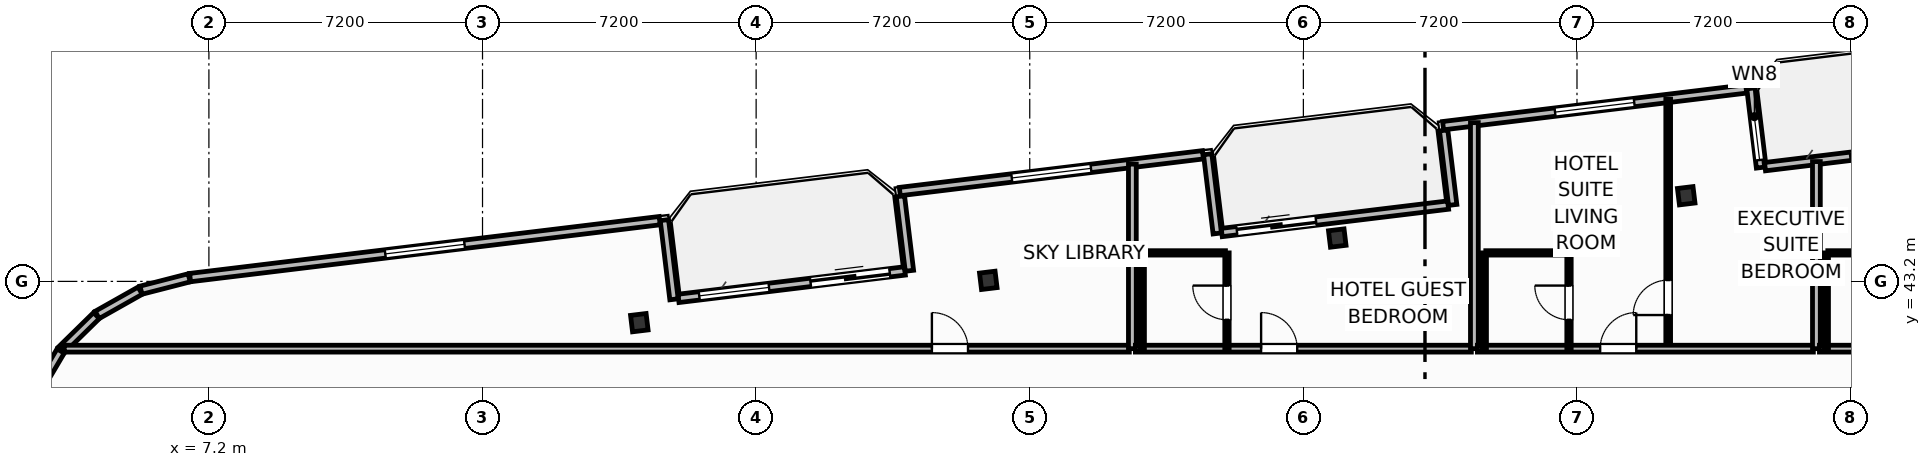
"""IFC4 building model, lengths in metres.
Left out: names, types, materials, properties, quantities, classifications, styles, units other than length and angle.
Written with IfcOpenShell. Run it as: python <this file> out.ifc"""

import sys

from ifc_helpers import new_model, si_unit, direction, frame, frame_2d, origin, origin_2d, place, context, subcontext, project, spatial, rectangle, i_section, extrude, element, fill, save


model = new_model("IFC4")
c1 = context("Model", 3, precision=1e-05, world=origin(), true_north=direction((0.0, 1.0)))
c2 = subcontext(c1, "Body", "Model", "MODEL_VIEW")
j1 = project(units=[si_unit("LENGTHUNIT", "METRE"), si_unit("PLANEANGLEUNIT", "RADIAN")], contexts=[c1])
p1 = place(None, origin())
s1 = spatial("IfcSite", under=j1, at=p1, CompositionType="ELEMENT")
p2 = place(p1, origin())
s2 = spatial("IfcBuilding", under=s1, at=p2, CompositionType="ELEMENT")
p3 = place(p2, frame((0.0, 0.0, 178.3)))
s3 = spatial("IfcBuildingStorey", under=s2, at=p3, CompositionType="ELEMENT", Elevation=178.3)
for number, where, z_axis, x_axis in (
    (1, (46.075, 45.454, 0.0), (0.0, 0.0, 1.0), (0.993, 0.12, 0.0)),
    (2, (36.892, 44.341, 0.0), (0.0, 0.0, 1.0), (0.993, 0.12, 0.0)),
    (3, (27.709, 43.227, 0.0), (0.0, 0.0, 1.0), (0.993, 0.12, 0.0)),
    (4, (18.526, 42.114, 0.0), (0.0, 0.0, 1.0), (0.993, 0.12, 0.0)),
):
    element("IfcColumn", number, at=place(p3, frame(where, z_axis=z_axis, x_axis=x_axis)), inside=s3, PredefinedType="COLUMN", context=c2, shape_type="SweptSolid", body=[
        extrude(i_section(OverallWidth=0.412, OverallDepth=0.435, WebThickness=0.036, FlangeThickness=0.057, FilletRadius=0.025, at=origin_2d()), origin(), (0.0, 0.0, 1.0), 3.7),
    ])
p4 = place(p3, frame((19.557, 42.753, 0.0), z_axis=(0.0, 0.0, 1.0), x_axis=(0.992729951822, 0.120362962556, 0.0)))
e5 = element("IfcWall", 5, at=p4, inside=s3, PredefinedType="SOLIDWALL", context=c2, shape_type="SweptSolid", body=[
    extrude(rectangle(XDim=6.0, YDim=0.22, at=frame_2d((3.0, 0.0))), origin(), (0.0, 0.0, 1.0), 2.73),
])
p5 = place(p4, frame((3.5, 0.0, 0.0)))
e6 = element("IfcOpeningElement", 6, at=p5, cuts=e5, PredefinedType="OPENING", context=c2, shape_type="SweptSolid", body=[
    extrude(rectangle(XDim=2.1, YDim=2.3, at=frame_2d((1.05, 1.15))), frame((0.0, 0.12, 0.0), z_axis=(0.0, -1.0, 0.0), x_axis=(1.0, 0.0, 0.0)), (0.0, 0.0, 1.0), 0.24),
])
p6 = place(p4, frame((0.55, 0.0, 0.75)))
e7 = element("IfcOpeningElement", 7, at=p6, cuts=e5, PredefinedType="OPENING", context=c2, shape_type="SweptSolid", body=[
    extrude(rectangle(XDim=1.85, YDim=1.75, at=frame_2d((0.925, 0.875))), frame((0.0, 0.12, 0.0), z_axis=(0.0, -1.0, 0.0), x_axis=(1.0, 0.0, 0.0)), (0.0, 0.0, 1.0), 0.24),
])
p7 = place(p3, frame((33.852, 44.486, 0.0), z_axis=(0.0, 0.0, 1.0), x_axis=(0.992729951822, 0.120362962556, 0.0)))
e8 = element("IfcWall", 8, at=p7, inside=s3, PredefinedType="SOLIDWALL", context=c2, shape_type="SweptSolid", body=[
    extrude(rectangle(XDim=6.0, YDim=0.22, at=frame_2d((3.0, 0.0))), origin(), (0.0, 0.0, 1.0), 2.73),
])
p8 = place(p7, frame((0.4, 0.0, 0.0)))
e9 = element("IfcOpeningElement", 9, at=p8, cuts=e8, PredefinedType="OPENING", context=c2, shape_type="SweptSolid", body=[
    extrude(rectangle(XDim=2.1, YDim=2.3, at=frame_2d((1.05, 1.15))), frame((0.0, 0.12, 0.0), z_axis=(0.0, -1.0, 0.0), x_axis=(1.0, 0.0, 0.0)), (0.0, 0.0, 1.0), 0.24),
])
p9 = place(p3, frame((48.148, 46.219, 0.0), z_axis=(0.0, 0.0, 1.0), x_axis=(0.992729951822, 0.120362962556, 0.0)))
e10 = element("IfcWall", 10, at=p9, inside=s3, PredefinedType="SOLIDWALL", context=c2, shape_type="SweptSolid", body=[
    extrude(rectangle(XDim=6.0, YDim=0.22, at=frame_2d((3.0, 0.0))), origin(), (0.0, 0.0, 1.0), 2.73),
])
p10 = place(p9, frame((2.26, 0.0, 0.0)))
e11 = element("IfcOpeningElement", 11, at=p10, cuts=e10, PredefinedType="OPENING", context=c2, shape_type="SweptSolid", body=[
    extrude(rectangle(XDim=2.1, YDim=2.3, at=frame_2d((1.05, 1.15))), frame((0.0, 0.12, 0.0), z_axis=(0.0, -1.0, 0.0), x_axis=(1.0, 0.0, 0.0)), (0.0, 0.0, 1.0), 0.24),
])
p11 = place(p3, frame((48.03, 46.194, 0.0), z_axis=(0.0, 0.0, 1.0), x_axis=(-0.120314009587, 0.992735885871, 0.0)))
e12 = element("IfcWall", 12, at=p11, inside=s3, PredefinedType="SOLIDWALL", context=c2, shape_type="SweptSolid", body=[
    extrude(rectangle(XDim=2.1, YDim=0.22, at=frame_2d((1.05, 0.0))), origin(), (0.0, 0.0, 1.0), 2.73),
])
p12 = place(p11, frame((0.2, 0.0, 0.8)))
e13 = element("IfcOpeningElement", 13, at=p12, cuts=e12, PredefinedType="OPENING", context=c2, shape_type="SweptSolid", body=[
    extrude(rectangle(XDim=1.15, YDim=1.4, at=frame_2d((0.575, 0.7))), frame((0.0, 0.12, 0.0), z_axis=(0.0, -1.0, 0.0), x_axis=(1.0, 0.0, 0.0)), (0.0, 0.0, 1.0), 0.24),
])
p13 = place(p3, frame((47.653, 48.264, 0.0), z_axis=(0.0, 0.0, 1.0), x_axis=(-0.992731032022, -0.120354052946, 0.0)))
e14 = element("IfcWall", 14, at=p13, inside=s3, PredefinedType="SOLIDWALL", context=c2, shape_type="SweptSolid", body=[
    extrude(rectangle(XDim=8.035, YDim=0.22, at=frame_2d((4.018, 0.0))), origin(), (0.0, 0.0, 1.0), 2.73),
])
p14 = place(p13, frame((2.968, 0.0, 0.8)))
e15 = element("IfcOpeningElement", 15, at=p14, cuts=e14, PredefinedType="OPENING", context=c2, shape_type="SweptSolid", body=[
    extrude(rectangle(XDim=2.1, YDim=1.75, at=frame_2d((1.05, 0.875))), frame((0.0, 0.12, 0.0), z_axis=(0.0, -1.0, 0.0), x_axis=(1.0, 0.0, 0.0)), (0.0, 0.0, 1.0), 0.24),
])
p15 = place(p3, frame((39.691, 47.173, 0.0), z_axis=(0.0, 0.0, 1.0), x_axis=(0.120397815541, -0.992725725472, 0.0)))
e16 = element("IfcWall", 16, at=p15, inside=s3, PredefinedType="SOLIDWALL", context=c2, shape_type="SweptSolid", body=[
    extrude(rectangle(XDim=1.975, YDim=0.22, at=frame_2d((0.988, 0.0))), origin(), (0.0, 0.0, 1.0), 2.73),
])
p16 = place(p3, frame((33.734, 44.461, 0.0), z_axis=(0.0, 0.0, 1.0), x_axis=(-0.120327895535, 0.992734202874, 0.0)))
e17 = element("IfcWall", 17, at=p16, inside=s3, PredefinedType="SOLIDWALL", context=c2, shape_type="SweptSolid", body=[
    extrude(rectangle(XDim=2.1, YDim=0.22, at=frame_2d((1.05, 0.0))), origin(), (0.0, 0.0, 1.0), 2.73),
])
p17 = place(p3, frame((33.357, 46.531, 0.0), z_axis=(0.0, 0.0, 1.0), x_axis=(-0.992731032022, -0.120354052946, 0.0)))
e18 = element("IfcWall", 18, at=p17, inside=s3, PredefinedType="SOLIDWALL", context=c2, shape_type="SweptSolid", body=[
    extrude(rectangle(XDim=8.035, YDim=0.22, at=frame_2d((4.018, 0.0))), origin(), (0.0, 0.0, 1.0), 2.73),
])
p18 = place(p17, frame((2.968, 0.0, 0.8)))
e19 = element("IfcOpeningElement", 19, at=p18, cuts=e18, PredefinedType="OPENING", context=c2, shape_type="SweptSolid", body=[
    extrude(rectangle(XDim=2.1, YDim=1.75, at=frame_2d((1.05, 0.875))), frame((0.0, 0.12, 0.0), z_axis=(0.0, -1.0, 0.0), x_axis=(1.0, 0.0, 0.0)), (0.0, 0.0, 1.0), 0.24),
])
p19 = place(p3, frame((25.396, 45.44, 0.0), z_axis=(0.0, 0.0, 1.0), x_axis=(0.120275992932, -0.992740492538, 0.0)))
e20 = element("IfcWall", 20, at=p19, inside=s3, PredefinedType="SOLIDWALL", context=c2, shape_type="SweptSolid", body=[
    extrude(rectangle(XDim=1.975, YDim=0.22, at=frame_2d((0.988, 0.0))), origin(), (0.0, 0.0, 1.0), 2.73),
])
p20 = place(p3, frame((19.439, 42.729, 0.0), z_axis=(0.0, 0.0, 1.0), x_axis=(-0.120327895535, 0.992734202874, 0.0)))
e21 = element("IfcWall", 21, at=p20, inside=s3, PredefinedType="SOLIDWALL", context=c2, shape_type="SweptSolid", body=[
    extrude(rectangle(XDim=2.1, YDim=0.22, at=frame_2d((1.05, 0.0))), origin(), (0.0, 0.0, 1.0), 2.73),
])
p21 = place(p3, frame((19.062, 44.798, 0.0), z_axis=(0.0, 0.0, 1.0), x_axis=(-0.992733569027, -0.120333124809, 0.0)))
e22 = element("IfcWall", 22, at=p21, inside=s3, PredefinedType="SOLIDWALL", context=c2, shape_type="SweptSolid", body=[
    extrude(rectangle(XDim=12.447, YDim=0.22, at=frame_2d((6.224, 0.0))), origin(), (0.0, 0.0, 1.0), 2.73),
])
p22 = place(p21, frame((5.174, 0.0, 0.8)))
e23 = element("IfcOpeningElement", 23, at=p22, cuts=e22, PredefinedType="OPENING", context=c2, shape_type="SweptSolid", body=[
    extrude(rectangle(XDim=2.1, YDim=1.75, at=frame_2d((1.05, 0.875))), frame((0.0, 0.12, 0.0), z_axis=(0.0, -1.0, 0.0), x_axis=(1.0, 0.0, 0.0)), (0.0, 0.0, 1.0), 0.24),
])
p23 = place(p3, frame((6.681, 43.294, 0.0), z_axis=(0.0, 0.0, 1.0), x_axis=(-0.968496788899, -0.2490260426, 0.0)))
e24 = element("IfcWall", 24, at=p23, inside=s3, PredefinedType="SOLIDWALL", context=c2, shape_type="SweptSolid", body=[
    extrude(rectangle(XDim=1.309, YDim=0.22, at=frame_2d((0.654, 0.0))), origin(), (0.0, 0.0, 1.0), 2.73),
])
for number, where, z_axis, x_axis in (
    (25, (5.392, 42.956, 0.0), (0.0, 0.0, 1.0), (-0.871, -0.491, 0.0)),
    (26, (4.241, 42.3, 0.0), (0.0, 0.0, 1.0), (-0.714, -0.7, 0.0)),
):
    element("IfcWall", number, at=place(p3, frame(where, z_axis=z_axis, x_axis=x_axis)), inside=s3, PredefinedType="SOLIDWALL", context=c2, shape_type="SweptSolid", body=[
        extrude(rectangle(XDim=1.301, YDim=0.22, at=frame_2d((0.65, 0.0))), origin(), (0.0, 0.0, 1.0), 2.73),
    ])
p24 = place(p3, frame((3.299, 41.368, 0.0), z_axis=(0.0, 0.0, 1.0), x_axis=(-0.508716668029, -0.860933999601, 0.0)))
e27 = element("IfcWall", 27, at=p24, inside=s3, PredefinedType="SOLIDWALL", context=c2, shape_type="SweptSolid", body=[
    extrude(rectangle(XDim=1.301, YDim=0.22, at=frame_2d((0.65, 0.0))), origin(), (0.0, 0.0, 1.0), 2.73),
])
p25 = place(p3, frame((3.393, 41.43, 0.0), z_axis=(0.0, 0.0, 1.0), x_axis=(1.0, 0.0, 0.0)))
e28 = element("IfcWall", 28, at=p25, inside=s3, PredefinedType="PARTITIONING", context=c2, shape_type="SweptSolid", body=[
    extrude(rectangle(XDim=28.027, YDim=0.18, at=frame_2d((14.013, 0.0))), origin(), (0.0, 0.0, 1.0), 2.662),
])
p26 = place(p25, frame((22.832, 0.0, 0.0)))
e29 = element("IfcOpeningElement", 29, at=p26, cuts=e28, PredefinedType="OPENING", context=c2, shape_type="SweptSolid", body=[
    extrude(rectangle(XDim=0.95, YDim=2.05, at=frame_2d((0.475, 1.025))), frame((0.0, 0.1, 0.0), z_axis=(0.0, -1.0, 0.0), x_axis=(1.0, 0.0, 0.0)), (0.0, 0.0, 1.0), 0.2),
])
p27 = place(p3, frame((31.5, 41.43, 0.0), z_axis=(0.0, 0.0, 1.0), x_axis=(0.0, 1.0, 0.0)))
e30 = element("IfcWall", 30, at=p27, inside=s3, PredefinedType="PARTITIONING", context=c2, shape_type="SweptSolid", body=[
    extrude(rectangle(XDim=4.856, YDim=0.205, at=frame_2d((2.428, 0.0))), origin(), (0.0, 0.0, 1.0), 3.45),
])
p28 = place(p3, frame((31.58, 41.43, 0.0), z_axis=(0.0, 0.0, 1.0), x_axis=(1.0, 0.0, 0.0)))
e31 = element("IfcWall", 31, at=p28, inside=s3, PredefinedType="PARTITIONING", context=c2, shape_type="SweptSolid", body=[
    extrude(rectangle(XDim=8.84, YDim=0.18, at=frame_2d((4.42, 0.0))), origin(), (0.0, 0.0, 1.0), 3.45),
])
p29 = place(p28, frame((3.308, 0.0, 0.0)))
e32 = element("IfcOpeningElement", 32, at=p29, cuts=e31, PredefinedType="OPENING", context=c2, shape_type="SweptSolid", body=[
    extrude(rectangle(XDim=0.95, YDim=2.15, at=frame_2d((0.475, 1.075))), frame((0.0, 0.1, 0.0), z_axis=(0.0, -1.0, 0.0), x_axis=(1.0, 0.0, 0.0)), (0.0, 0.0, 1.0), 0.2),
])
p30 = place(p3, frame((31.8, 43.95, 0.0), z_axis=(0.0, 0.0, 1.0), x_axis=(1.0, 0.0, 0.0)))
e33 = element("IfcWall", 33, at=p30, inside=s3, PredefinedType="PARTITIONING", context=c2, shape_type="SweptSolid", body=[
    extrude(rectangle(XDim=2.15, YDim=0.115, at=frame_2d((1.075, 0.0))), origin(), (0.0, 0.0, 1.0), 2.824),
])
p31 = place(p3, frame((33.99, 41.43, 0.0), z_axis=(0.0, 0.0, 1.0), x_axis=(0.0, 1.0, 0.0)))
e34 = element("IfcWall", 34, at=p31, inside=s3, PredefinedType="PARTITIONING", context=c2, shape_type="SweptSolid", body=[
    extrude(rectangle(XDim=2.52, YDim=0.115, at=frame_2d((1.26, 0.0))), origin(), (0.0, 0.0, 1.0), 3.45),
])
p32 = place(p31, frame((0.76, 0.0, 0.0)))
e35 = element("IfcOpeningElement", 35, at=p32, cuts=e34, PredefinedType="OPENING", context=c2, shape_type="SweptSolid", body=[
    extrude(rectangle(XDim=0.9, YDim=2.05, at=frame_2d((0.45, 1.025))), frame((0.0, 0.067, 0.0), z_axis=(0.0, -1.0, 0.0), x_axis=(1.0, 0.0, 0.0)), (0.0, 0.0, 1.0), 0.135),
])
p33 = place(p3, frame((31.76, 41.43, 0.0), z_axis=(0.0, 0.0, 1.0), x_axis=(0.0, 1.0, 0.0)))
e36 = element("IfcWall", 36, at=p33, inside=s3, PredefinedType="PARTITIONING", context=c2, shape_type="SweptSolid", body=[
    extrude(rectangle(XDim=2.52, YDim=0.115, at=frame_2d((1.26, 0.0))), origin(), (0.0, 0.0, 1.0), 3.45),
])
p34 = place(p3, frame((40.5, 41.43, 0.0), z_axis=(0.0, 0.0, 1.0), x_axis=(0.0, 1.0, 0.0)))
e37 = element("IfcWall", 37, at=p34, inside=s3, PredefinedType="PARTITIONING", context=c2, shape_type="SweptSolid", body=[
    extrude(rectangle(XDim=5.947, YDim=0.205, at=frame_2d((2.974, 0.0))), origin(), (0.0, 0.0, 1.0), 3.45),
])
p35 = place(p3, frame((45.6, 41.43, 0.0), z_axis=(0.0, 0.0, 1.0), x_axis=(0.0, 1.0, 0.0)))
e38 = element("IfcWall", 38, at=p35, inside=s3, PredefinedType="PARTITIONING", context=c2, shape_type="SweptSolid", body=[
    extrude(rectangle(XDim=6.565, YDim=0.125, at=frame_2d((3.283, 0.0))), origin(), (0.0, 0.0, 1.0), 3.45),
])
p36 = place(p35, frame((0.885, 0.0, 0.0)))
e39 = element("IfcOpeningElement", 39, at=p36, cuts=e38, PredefinedType="OPENING", context=c2, shape_type="SweptSolid", body=[
    extrude(rectangle(XDim=0.92, YDim=2.05, at=frame_2d((0.46, 1.025))), frame((0.0, 0.073, 0.0), z_axis=(0.0, -1.0, 0.0), x_axis=(1.0, 0.0, 0.0)), (0.0, 0.0, 1.0), 0.145),
])
p37 = place(p3, frame((40.58, 41.43, 0.0), z_axis=(0.0, 0.0, 1.0), x_axis=(1.0, 0.0, 0.0)))
e40 = element("IfcWall", 40, at=p37, inside=s3, PredefinedType="PARTITIONING", context=c2, shape_type="SweptSolid", body=[
    extrude(rectangle(XDim=8.84, YDim=0.18, at=frame_2d((4.42, 0.0))), origin(), (0.0, 0.0, 1.0), 3.45),
])
p38 = place(p37, frame((3.23, 0.0, 0.0)))
e41 = element("IfcOpeningElement", 41, at=p38, cuts=e40, PredefinedType="OPENING", context=c2, shape_type="SweptSolid", body=[
    extrude(rectangle(XDim=0.95, YDim=2.15, at=frame_2d((0.475, 1.075))), frame((0.0, 0.1, 0.0), z_axis=(0.0, -1.0, 0.0), x_axis=(1.0, 0.0, 0.0)), (0.0, 0.0, 1.0), 0.2),
])
p39 = place(p3, frame((40.8, 43.95, 0.0), z_axis=(0.0, 0.0, 1.0), x_axis=(1.0, 0.0, 0.0)))
e42 = element("IfcWall", 42, at=p39, inside=s3, PredefinedType="PARTITIONING", context=c2, shape_type="SweptSolid", body=[
    extrude(rectangle(XDim=2.15, YDim=0.115, at=frame_2d((1.075, 0.0))), origin(), (0.0, 0.0, 1.0), 3.45),
])
p40 = place(p3, frame((42.99, 41.43, 0.0), z_axis=(0.0, 0.0, 1.0), x_axis=(0.0, 1.0, 0.0)))
e43 = element("IfcWall", 43, at=p40, inside=s3, PredefinedType="PARTITIONING", context=c2, shape_type="SweptSolid", body=[
    extrude(rectangle(XDim=2.52, YDim=0.115, at=frame_2d((1.26, 0.0))), origin(), (0.0, 0.0, 1.0), 3.45),
])
p41 = place(p40, frame((0.76, 0.0, 0.0)))
e44 = element("IfcOpeningElement", 44, at=p41, cuts=e43, PredefinedType="OPENING", context=c2, shape_type="SweptSolid", body=[
    extrude(rectangle(XDim=0.9, YDim=2.05, at=frame_2d((0.45, 1.025))), frame((0.0, 0.067, 0.0), z_axis=(0.0, -1.0, 0.0), x_axis=(1.0, 0.0, 0.0)), (0.0, 0.0, 1.0), 0.135),
])
p42 = place(p3, frame((40.76, 41.43, 0.0), z_axis=(0.0, 0.0, 1.0), x_axis=(0.0, 1.0, 0.0)))
e45 = element("IfcWall", 45, at=p42, inside=s3, PredefinedType="PARTITIONING", context=c2, shape_type="SweptSolid", body=[
    extrude(rectangle(XDim=2.52, YDim=0.115, at=frame_2d((1.26, 0.0))), origin(), (0.0, 0.0, 1.0), 3.45),
])
p43 = place(p3, frame((49.5, 41.43, 0.0), z_axis=(0.0, 0.0, 1.0), x_axis=(0.0, 1.0, 0.0)))
e46 = element("IfcWall", 46, at=p43, inside=s3, PredefinedType="PARTITIONING", context=c2, shape_type="SweptSolid", body=[
    extrude(rectangle(XDim=4.923, YDim=0.205, at=frame_2d((2.461, 0.0))), origin(), (0.0, 0.0, 1.0), 3.45),
])
p44 = place(p3, frame((49.58, 41.43, 0.0), z_axis=(0.0, 0.0, 1.0), x_axis=(1.0, 0.0, 0.0)))
e47 = element("IfcWall", 47, at=p44, inside=s3, PredefinedType="PARTITIONING", context=c2, shape_type="SweptSolid", body=[
    extrude(rectangle(XDim=23.042, YDim=0.18, at=frame_2d((11.521, 0.0))), origin(), (0.0, 0.0, 1.0), 3.45),
])
p45 = place(p44, frame((3.317, 0.0, 0.0)))
e48 = element("IfcOpeningElement", 48, at=p45, cuts=e47, PredefinedType="OPENING", context=c2, shape_type="SweptSolid", body=[
    extrude(rectangle(XDim=0.95, YDim=2.15, at=frame_2d((0.475, 1.075))), frame((0.0, 0.1, 0.0), z_axis=(0.0, -1.0, 0.0), x_axis=(1.0, 0.0, 0.0)), (0.0, 0.0, 1.0), 0.2),
])
p46 = place(p3, frame((49.8, 43.95, 0.0), z_axis=(0.0, 0.0, 1.0), x_axis=(1.0, 0.0, 0.0)))
e49 = element("IfcWall", 49, at=p46, inside=s3, PredefinedType="PARTITIONING", context=c2, shape_type="SweptSolid", body=[
    extrude(rectangle(XDim=2.15, YDim=0.115, at=frame_2d((1.075, 0.0))), origin(), (0.0, 0.0, 1.0), 3.45),
])
p47 = place(p3, frame((49.76, 41.43, 0.0), z_axis=(0.0, 0.0, 1.0), x_axis=(0.0, 1.0, 0.0)))
e50 = element("IfcWall", 50, at=p47, inside=s3, PredefinedType="PARTITIONING", context=c2, shape_type="SweptSolid", body=[
    extrude(rectangle(XDim=2.52, YDim=0.115, at=frame_2d((1.26, 0.0))), origin(), (0.0, 0.0, 1.0), 3.45),
])
p48 = place(p5, origin())
e51 = element("IfcDoor", 51, at=p48, inside=s3, OperationType="SLIDING_TO_LEFT", PredefinedType="DOOR", context=c2, shape_type="SweptSolid", body=[
    extrude(rectangle(XDim=2.1, YDim=2.3, at=frame_2d((1.05, 1.15))), frame((0.0, 0.025, 0.0), z_axis=(0.0, -1.0, 0.0), x_axis=(1.0, 0.0, 0.0)), (0.0, 0.0, 1.0), 0.05),
])
fill(e6, e51)
p49 = place(p6, origin())
e52 = element("IfcWindow", 52, at=p49, inside=s3, PartitioningType="SINGLE_PANEL", PredefinedType="WINDOW", context=c2, shape_type="SweptSolid", body=[
    extrude(rectangle(XDim=1.85, YDim=1.75, at=frame_2d((0.925, 0.875))), frame((0.0, 0.03, 0.0), z_axis=(0.0, -1.0, 0.0), x_axis=(1.0, 0.0, 0.0)), (0.0, 0.0, 1.0), 0.06),
])
fill(e7, e52)
p50 = place(p8, origin())
e53 = element("IfcDoor", 53, at=p50, inside=s3, OperationType="SLIDING_TO_LEFT", PredefinedType="DOOR", context=c2, shape_type="SweptSolid", body=[
    extrude(rectangle(XDim=2.1, YDim=2.3, at=frame_2d((1.05, 1.15))), frame((0.0, 0.025, 0.0), z_axis=(0.0, -1.0, 0.0), x_axis=(1.0, 0.0, 0.0)), (0.0, 0.0, 1.0), 0.05),
])
fill(e9, e53)
p51 = place(p10, origin())
e54 = element("IfcDoor", 54, at=p51, inside=s3, OperationType="SLIDING_TO_LEFT", PredefinedType="DOOR", context=c2, shape_type="SweptSolid", body=[
    extrude(rectangle(XDim=2.1, YDim=2.3, at=frame_2d((1.05, 1.15))), frame((0.0, 0.025, 0.0), z_axis=(0.0, -1.0, 0.0), x_axis=(1.0, 0.0, 0.0)), (0.0, 0.0, 1.0), 0.05),
])
fill(e11, e54)
p52 = place(p14, origin())
e55 = element("IfcWindow", 55, at=p52, inside=s3, PartitioningType="SINGLE_PANEL", PredefinedType="WINDOW", context=c2, shape_type="SweptSolid", body=[
    extrude(rectangle(XDim=2.1, YDim=1.75, at=frame_2d((1.05, 0.875))), frame((0.0, 0.03, 0.0), z_axis=(0.0, -1.0, 0.0), x_axis=(1.0, 0.0, 0.0)), (0.0, 0.0, 1.0), 0.06),
])
fill(e15, e55)
p53 = place(p18, origin())
e56 = element("IfcWindow", 56, at=p53, inside=s3, PartitioningType="SINGLE_PANEL", PredefinedType="WINDOW", context=c2, shape_type="SweptSolid", body=[
    extrude(rectangle(XDim=2.1, YDim=1.75, at=frame_2d((1.05, 0.875))), frame((0.0, 0.03, 0.0), z_axis=(0.0, -1.0, 0.0), x_axis=(1.0, 0.0, 0.0)), (0.0, 0.0, 1.0), 0.06),
])
fill(e19, e56)
p54 = place(p22, origin())
e57 = element("IfcWindow", 57, at=p54, inside=s3, PartitioningType="SINGLE_PANEL", PredefinedType="WINDOW", context=c2, shape_type="SweptSolid", body=[
    extrude(rectangle(XDim=2.1, YDim=1.75, at=frame_2d((1.05, 0.875))), frame((0.0, 0.03, 0.0), z_axis=(0.0, -1.0, 0.0), x_axis=(1.0, 0.0, 0.0)), (0.0, 0.0, 1.0), 0.06),
])
fill(e23, e57)
p55 = place(p26, origin())
e58 = element("IfcDoor", 58, at=p55, inside=s3, OperationType="SINGLE_SWING_LEFT", PredefinedType="DOOR", context=c2, shape_type="SweptSolid", body=[
    extrude(rectangle(XDim=0.95, YDim=2.05, at=frame_2d((0.475, 1.025))), frame((0.0, 0.025, 0.0), z_axis=(0.0, -1.0, 0.0), x_axis=(1.0, 0.0, 0.0)), (0.0, 0.0, 1.0), 0.05),
])
fill(e29, e58)
p56 = place(p29, origin())
e59 = element("IfcDoor", 59, at=p56, inside=s3, OperationType="SINGLE_SWING_LEFT", PredefinedType="DOOR", context=c2, shape_type="SweptSolid", body=[
    extrude(rectangle(XDim=0.95, YDim=2.15, at=frame_2d((0.475, 1.075))), frame((0.0, 0.025, 0.0), z_axis=(0.0, -1.0, 0.0), x_axis=(1.0, 0.0, 0.0)), (0.0, 0.0, 1.0), 0.05),
])
fill(e32, e59)
p57 = place(p32, origin())
e60 = element("IfcDoor", 60, at=p57, inside=s3, OperationType="SINGLE_SWING_RIGHT", PredefinedType="DOOR", context=c2, shape_type="SweptSolid", body=[
    extrude(rectangle(XDim=0.9, YDim=2.05, at=frame_2d((0.45, 1.025))), frame((0.0, 0.025, 0.0), z_axis=(0.0, -1.0, 0.0), x_axis=(1.0, 0.0, 0.0)), (0.0, 0.0, 1.0), 0.05),
])
fill(e35, e60)
p58 = place(p36, origin())
e61 = element("IfcDoor", 61, at=p58, inside=s3, OperationType="SINGLE_SWING_LEFT", PredefinedType="DOOR", context=c2, shape_type="SweptSolid", body=[
    extrude(rectangle(XDim=0.92, YDim=2.05, at=frame_2d((0.46, 1.025))), frame((0.0, 0.025, 0.0), z_axis=(0.0, -1.0, 0.0), x_axis=(1.0, 0.0, 0.0)), (0.0, 0.0, 1.0), 0.05),
])
fill(e39, e61)
p59 = place(p38, origin())
e62 = element("IfcDoor", 62, at=p59, inside=s3, OperationType="SINGLE_SWING_RIGHT", PredefinedType="DOOR", context=c2, shape_type="SweptSolid", body=[
    extrude(rectangle(XDim=0.95, YDim=2.15, at=frame_2d((0.475, 1.075))), frame((0.0, 0.025, 0.0), z_axis=(0.0, -1.0, 0.0), x_axis=(1.0, 0.0, 0.0)), (0.0, 0.0, 1.0), 0.05),
])
fill(e41, e62)
p60 = place(p41, origin())
e63 = element("IfcDoor", 63, at=p60, inside=s3, OperationType="SINGLE_SWING_RIGHT", PredefinedType="DOOR", context=c2, shape_type="SweptSolid", body=[
    extrude(rectangle(XDim=0.9, YDim=2.05, at=frame_2d((0.45, 1.025))), frame((0.0, 0.025, 0.0), z_axis=(0.0, -1.0, 0.0), x_axis=(1.0, 0.0, 0.0)), (0.0, 0.0, 1.0), 0.05),
])
fill(e44, e63)
p61 = place(p12, origin())
e64 = element("IfcWindow", 64, at=p61, inside=s3, PartitioningType="SINGLE_PANEL", PredefinedType="WINDOW", context=c2, shape_type="SweptSolid", body=[
    extrude(rectangle(XDim=1.15, YDim=1.4, at=frame_2d((0.575, 0.7))), frame((0.0, 0.03, 0.0), z_axis=(0.0, -1.0, 0.0), x_axis=(1.0, 0.0, 0.0)), (0.0, 0.0, 1.0), 0.06),
])
fill(e13, e64)
save(model, sys.argv[1])
